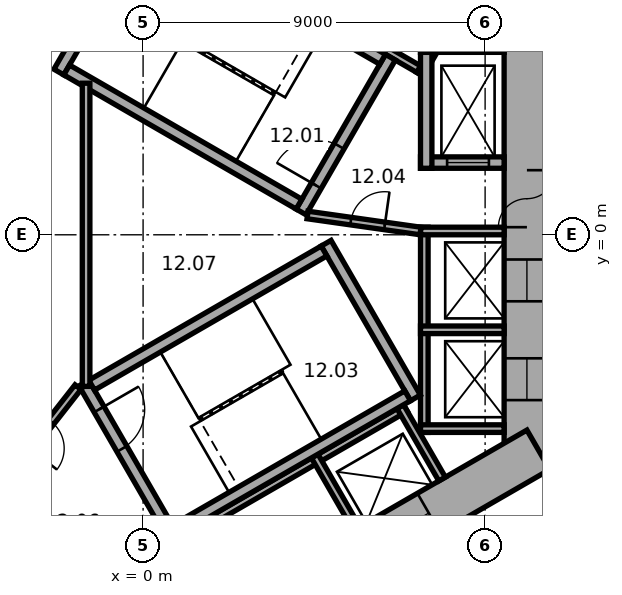
"""IFC4 building model, lengths in metres.
Left out: names, types, materials, properties, quantities, classifications, styles, units other than length and angle.
Written with IfcOpenShell. Run it as: python <this file> out.ifc"""

import sys

from ifc_helpers import new_model, si_unit, direction, frame, frame_2d, origin, place, context, subcontext, project, spatial, rectangle, extrude, element, fill, save


model = new_model("IFC4")
c1 = context("Model", 3, precision=1e-05, world=origin(), true_north=direction((0.0, 1.0)))
c2 = subcontext(c1, "Body", "Model", "MODEL_VIEW")
j1 = project(units=[si_unit("LENGTHUNIT", "METRE"), si_unit("PLANEANGLEUNIT", "RADIAN")], contexts=[c1])
p1 = place(None, origin())
s1 = spatial("IfcSite", under=j1, at=p1, CompositionType="ELEMENT")
p2 = place(p1, origin())
s2 = spatial("IfcBuilding", under=s1, at=p2, CompositionType="ELEMENT")
p3 = place(p2, frame((0.0, 0.0, 60.5)))
s3 = spatial("IfcBuildingStorey", under=s2, at=p3, CompositionType="ELEMENT", Elevation=60.5)
p4 = place(p3, frame((10.1, -6.177, 0.0), z_axis=(0.0, 0.0, 1.0), x_axis=(0.0, 1.0, 0.0)))
e1 = element("IfcWall", 1, at=p4, inside=s3, PredefinedType="SHEAR", context=c2, shape_type="SweptSolid", body=[
    extrude(rectangle(XDim=12.355, YDim=1.2, at=frame_2d((6.177, 0.0))), origin(), (0.0, 0.0, 1.0), 3.3),
])
p5 = place(p4, frame((6.378, 0.0, 0.0)))
e2 = element("IfcOpeningElement", 2, at=p5, cuts=e1, PredefinedType="OPENING", context=c2, shape_type="SweptSolid", body=[
    extrude(rectangle(XDim=1.5, YDim=2.1, at=frame_2d((0.75, 1.05))), frame((0.0, 0.61, 0.0), z_axis=(0.0, -1.0, 0.0), x_axis=(1.0, 0.0, 0.0)), (0.0, 0.0, 1.0), 1.22),
])
p6 = place(p4, frame((1.828, 0.0, 0.0)))
e3 = element("IfcOpeningElement", 3, at=p6, cuts=e1, PredefinedType="OPENING", context=c2, shape_type="SweptSolid", body=[
    extrude(rectangle(XDim=1.1, YDim=2.1, at=frame_2d((0.55, 1.05))), frame((0.0, 0.61, 0.0), z_axis=(0.0, -1.0, 0.0), x_axis=(1.0, 0.0, 0.0)), (0.0, 0.0, 1.0), 1.22),
])
p7 = place(p4, frame((4.427, 0.0, 0.0)))
e4 = element("IfcOpeningElement", 4, at=p7, cuts=e1, PredefinedType="OPENING", context=c2, shape_type="SweptSolid", body=[
    extrude(rectangle(XDim=1.1, YDim=2.1, at=frame_2d((0.55, 1.05))), frame((0.0, 0.61, 0.0), z_axis=(0.0, -1.0, 0.0), x_axis=(1.0, 0.0, 0.0)), (0.0, 0.0, 1.0), 1.22),
])
p8 = place(p3, frame((-10.4, -5.658, 0.0), z_axis=(0.0, 0.0, 1.0), x_axis=(0.866021384402, -0.500006961711, 0.0)))
e5 = element("IfcWall", 5, at=p8, inside=s3, PredefinedType="SHEAR", context=c2, shape_type="SweptSolid", body=[
    extrude(rectangle(XDim=12.355, YDim=1.2, at=frame_2d((6.178, 0.0))), origin(), (0.0, 0.0, 1.0), 3.3),
])
p9 = place(p8, frame((6.378, 0.0, 0.0)))
e6 = element("IfcOpeningElement", 6, at=p9, cuts=e5, PredefinedType="OPENING", context=c2, shape_type="SweptSolid", body=[
    extrude(rectangle(XDim=1.5, YDim=2.1, at=frame_2d((0.75, 1.05))), frame((0.0, 0.61, 0.0), z_axis=(0.0, -1.0, 0.0), x_axis=(1.0, 0.0, 0.0)), (0.0, 0.0, 1.0), 1.22),
])
p10 = place(p8, frame((1.928, 0.0, 0.0)))
e7 = element("IfcOpeningElement", 7, at=p10, cuts=e5, PredefinedType="OPENING", context=c2, shape_type="SweptSolid", body=[
    extrude(rectangle(XDim=0.9, YDim=2.1, at=frame_2d((0.45, 1.05))), frame((0.0, 0.61, 0.0), z_axis=(0.0, -1.0, 0.0), x_axis=(1.0, 0.0, 0.0)), (0.0, 0.0, 1.0), 1.22),
])
p11 = place(p8, frame((4.528, 0.0, 0.0)))
e8 = element("IfcOpeningElement", 8, at=p11, cuts=e5, PredefinedType="OPENING", context=c2, shape_type="SweptSolid", body=[
    extrude(rectangle(XDim=0.9, YDim=2.1, at=frame_2d((0.45, 1.05))), frame((0.0, 0.61, 0.0), z_axis=(0.0, -1.0, 0.0), x_axis=(1.0, 0.0, 0.0)), (0.0, 0.0, 1.0), 1.22),
])
p12 = place(p3, frame((-0.3, -11.836, 0.0), z_axis=(0.0, 0.0, 1.0), x_axis=(0.866021384402, 0.500006961711, 0.0)))
e9 = element("IfcWall", 9, at=p12, inside=s3, PredefinedType="SHEAR", context=c2, shape_type="SweptSolid", body=[
    extrude(rectangle(XDim=12.355, YDim=1.2, at=frame_2d((6.178, 0.0))), origin(), (0.0, 0.0, 1.0), 3.3),
])
p13 = place(p12, frame((4.128, 0.0, 0.0)))
e10 = element("IfcOpeningElement", 10, at=p13, cuts=e9, PredefinedType="OPENING", context=c2, shape_type="SweptSolid", body=[
    extrude(rectangle(XDim=0.9, YDim=2.1, at=frame_2d((0.45, 1.05))), frame((0.0, 0.61, 0.0), z_axis=(0.0, -1.0, 0.0), x_axis=(1.0, 0.0, 0.0)), (0.0, 0.0, 1.0), 1.22),
])
p14 = place(p12, frame((7.928, 0.0, 0.0)))
e11 = element("IfcOpeningElement", 11, at=p14, cuts=e9, PredefinedType="OPENING", context=c2, shape_type="SweptSolid", body=[
    extrude(rectangle(XDim=1.1, YDim=2.1, at=frame_2d((0.55, 1.05))), frame((0.0, 0.61, 0.0), z_axis=(0.0, -1.0, 0.0), x_axis=(1.0, 0.0, 0.0)), (0.0, 0.0, 1.0), 1.22),
])
p15 = place(p3, frame((7.4, -5.2, 0.0), z_axis=(0.0, 0.0, 1.0), x_axis=(0.0, 1.0, 0.0)))
e12 = element("IfcWall", 12, at=p15, inside=s3, PredefinedType="PARTITIONING", context=c2, shape_type="SweptSolid", body=[
    extrude(rectangle(XDim=5.4, YDim=0.2, at=frame_2d((2.7, 0.0))), origin(), (0.0, 0.0, 1.0), 3.05),
])
for number, where, z_axis, x_axis in (
    (13, (7.3, -5.1, 0.0), (0.0, 0.0, 1.0), (1.0, 0.0, 0.0)),
    (14, (7.3, -2.5, 0.0), (0.0, 0.0, 1.0), (1.0, 0.0, 0.0)),
    (15, (7.3, 0.1, 0.0), (0.0, 0.0, 1.0), (1.0, 0.0, 0.0)),
):
    element("IfcWall", number, at=place(p3, frame(where, z_axis=z_axis, x_axis=x_axis)), inside=s3, PredefinedType="PARTITIONING", context=c2, shape_type="SweptSolid", body=[
        extrude(rectangle(XDim=2.2, YDim=0.2, at=frame_2d((1.1, 0.0))), origin(), (0.0, 0.0, 1.0), 3.05),
    ])
p16 = place(p3, frame((7.424, 4.259, 0.0), z_axis=(0.0, 0.0, 1.0), x_axis=(-0.866026010844, 0.49999894854, 0.0)))
e16 = element("IfcWall", 16, at=p16, inside=s3, PredefinedType="PARTITIONING", context=c2, shape_type="SweptSolid", body=[
    extrude(rectangle(XDim=8.0, YDim=0.2, at=frame_2d((4.0, 0.0))), origin(), (0.0, 0.0, 1.0), 3.05),
])
p17 = place(p3, frame((7.287, 4.222, 0.0), z_axis=(0.0, 0.0, 1.0), x_axis=(0.499946605688, 0.86605622881, 0.0)))
e17 = element("IfcWall", 17, at=p17, inside=s3, PredefinedType="PARTITIONING", context=c2, shape_type="SweptSolid", body=[
    extrude(rectangle(XDim=2.2, YDim=0.2, at=frame_2d((1.1, 0.0))), origin(), (0.0, 0.0, 1.0), 3.05),
])
p18 = place(p3, frame((-0.024, -8.559, 0.0), z_axis=(0.0, 0.0, 1.0), x_axis=(0.866026010844, 0.49999894854, 0.0)))
e18 = element("IfcWall", 18, at=p18, inside=s3, PredefinedType="PARTITIONING", context=c2, shape_type="SweptSolid", body=[
    extrude(rectangle(XDim=8.0, YDim=0.2, at=frame_2d((4.0, 0.0))), origin(), (0.0, 0.0, 1.0), 3.05),
])
for number, where, z_axis, x_axis in (
    (19, (4.516, -5.822, 0.0), (0.0, 0.0, 1.0), (0.5, -0.866, 0.0)),
    (20, (6.768, -4.522, 0.0), (0.0, 0.0, 1.0), (0.5, -0.866, 0.0)),
):
    element("IfcWall", number, at=place(p3, frame(where, z_axis=z_axis, x_axis=x_axis)), inside=s3, PredefinedType="PARTITIONING", context=c2, shape_type="SweptSolid", body=[
        extrude(rectangle(XDim=2.2, YDim=0.2, at=frame_2d((1.1, 0.0))), origin(), (0.0, 0.0, 1.0), 3.05),
    ])
p19 = place(p3, frame((4.158, 0.602, 0.0), z_axis=(0.0, 0.0, 1.0), x_axis=(0.499977259774, 0.866038532462, 0.0)))
e21 = element("IfcWall", 21, at=p19, inside=s3, PredefinedType="SHEAR", context=c2, shape_type="SweptSolid", body=[
    extrude(rectangle(XDim=4.7, YDim=0.3, at=frame_2d((2.35, 0.0))), origin(), (0.0, 0.0, 1.0), 3.05),
])
p20 = place(p19, frame((0.8, 0.0, 0.0)))
e22 = element("IfcOpeningElement", 22, at=p20, cuts=e21, PredefinedType="OPENING", context=c2, shape_type="SweptSolid", body=[
    extrude(rectangle(XDim=1.2, YDim=2.1, at=frame_2d((0.6, 1.05))), frame((0.0, 0.16, 0.0), z_axis=(0.0, -1.0, 0.0), x_axis=(1.0, 0.0, 0.0)), (0.0, 0.0, 1.0), 0.32),
])
p21 = place(p3, frame((-2.216, 4.282, 0.0), z_axis=(0.0, 0.0, 1.0), x_axis=(0.499977259774, 0.866038532462, 0.0)))
e23 = element("IfcWall", 23, at=p21, inside=s3, PredefinedType="SHEAR", context=c2, shape_type="SweptSolid", body=[
    extrude(rectangle(XDim=4.7, YDim=0.3, at=frame_2d((2.35, 0.0))), origin(), (0.0, 0.0, 1.0), 3.05),
])
for number, where, z_axis, x_axis in (
    (24, (4.103, 0.807, 0.0), (0.0, 0.0, 1.0), (-0.866, 0.5, 0.0)),
    (25, (6.303, 4.617, 0.0), (0.0, 0.0, 1.0), (-0.866, 0.5, 0.0)),
):
    element("IfcWall", number, at=place(p3, frame(where, z_axis=z_axis, x_axis=x_axis)), inside=s3, PredefinedType="SHEAR", context=c2, shape_type="SweptSolid", body=[
        extrude(rectangle(XDim=7.06, YDim=0.3, at=frame_2d((3.53, 0.0))), origin(), (0.0, 0.0, 1.0), 3.05),
    ])
p22 = place(p3, frame((-1.558, -3.902, 0.0), z_axis=(0.0, 0.0, 1.0), x_axis=(0.499977259774, -0.866038532462, 0.0)))
e26 = element("IfcWall", 26, at=p22, inside=s3, PredefinedType="SHEAR", context=c2, shape_type="SweptSolid", body=[
    extrude(rectangle(XDim=4.7, YDim=0.3, at=frame_2d((2.35, 0.0))), origin(), (0.0, 0.0, 1.0), 3.05),
])
p23 = place(p22, frame((0.8, 0.0, 0.0)))
e27 = element("IfcOpeningElement", 27, at=p23, cuts=e26, PredefinedType="OPENING", context=c2, shape_type="SweptSolid", body=[
    extrude(rectangle(XDim=1.2, YDim=2.1, at=frame_2d((0.6, 1.05))), frame((0.0, 0.16, 0.0), z_axis=(0.0, -1.0, 0.0), x_axis=(1.0, 0.0, 0.0)), (0.0, 0.0, 1.0), 0.32),
])
p24 = place(p3, frame((4.816, -0.222, 0.0), z_axis=(0.0, 0.0, 1.0), x_axis=(0.499977259774, -0.866038532462, 0.0)))
e28 = element("IfcWall", 28, at=p24, inside=s3, PredefinedType="SHEAR", context=c2, shape_type="SweptSolid", body=[
    extrude(rectangle(XDim=4.7, YDim=0.3, at=frame_2d((2.35, 0.0))), origin(), (0.0, 0.0, 1.0), 3.05),
])
for number, where, z_axis, x_axis in (
    (29, (-1.353, -3.957, 0.0), (0.0, 0.0, 1.0), (0.866, 0.5, 0.0)),
    (30, (0.847, -7.767, 0.0), (0.0, 0.0, 1.0), (0.866, 0.5, 0.0)),
):
    element("IfcWall", number, at=place(p3, frame(where, z_axis=z_axis, x_axis=x_axis)), inside=s3, PredefinedType="SHEAR", context=c2, shape_type="SweptSolid", body=[
        extrude(rectangle(XDim=7.06, YDim=0.3, at=frame_2d((3.53, 0.0))), origin(), (0.0, 0.0, 1.0), 3.05),
    ])
p25 = place(p3, frame((7.3, 1.9, 0.0), z_axis=(0.0, 0.0, 1.0), x_axis=(1.0, 0.0, 0.0)))
e31 = element("IfcWall", 31, at=p25, inside=s3, PredefinedType="SHEAR", context=c2, shape_type="SweptSolid", body=[
    extrude(rectangle(XDim=2.2, YDim=0.3, at=frame_2d((1.1, 0.0))), origin(), (0.0, 0.0, 1.0), 3.05),
])
p26 = place(p25, frame((0.7, 0.0, 0.0)))
e32 = element("IfcOpeningElement", 32, at=p26, cuts=e31, PredefinedType="OPENING", context=c2, shape_type="SweptSolid", body=[
    extrude(rectangle(XDim=1.1, YDim=2.1, at=frame_2d((0.55, 1.05))), frame((0.0, 0.16, 0.0), z_axis=(0.0, -1.0, 0.0), x_axis=(1.0, 0.0, 0.0)), (0.0, 0.0, 1.0), 0.32),
])
p27 = place(p3, frame((7.45, 1.75, 0.0), z_axis=(0.0, 0.0, 1.0), x_axis=(0.0, 1.0, 0.0)))
e33 = element("IfcWall", 33, at=p27, inside=s3, PredefinedType="SHEAR", context=c2, shape_type="SweptSolid", body=[
    extrude(rectangle(XDim=3.35, YDim=0.3, at=frame_2d((1.675, 0.0))), origin(), (0.0, 0.0, 1.0), 3.05),
])
p28 = place(p3, frame((7.3, 4.95, 0.0), z_axis=(0.0, 0.0, 1.0), x_axis=(1.0, 0.0, 0.0)))
e34 = element("IfcWall", 34, at=p28, inside=s3, PredefinedType="SHEAR", context=c2, shape_type="SweptSolid", body=[
    extrude(rectangle(XDim=2.2, YDim=0.3, at=frame_2d((1.1, 0.0))), origin(), (0.0, 0.0, 1.0), 3.05),
])
p29 = place(p3, frame((4.327, 0.521, 0.0), z_axis=(0.0, 0.0, 1.0), x_axis=(0.990124376366, -0.14019172346, 0.0)))
e35 = element("IfcWall", 35, at=p29, inside=s3, PredefinedType="PARTITIONING", context=c2, shape_type="SweptSolid", body=[
    extrude(rectangle(XDim=3.002, YDim=0.2, at=frame_2d((1.501, 0.0))), origin(), (0.0, 0.0, 1.0), 3.05),
])
p30 = place(p29, frame((1.15, 0.0, 0.0)))
e36 = element("IfcOpeningElement", 36, at=p30, cuts=e35, PredefinedType="OPENING", context=c2, shape_type="SweptSolid", body=[
    extrude(rectangle(XDim=0.9, YDim=2.1, at=frame_2d((0.45, 1.05))), frame((0.0, 0.11, 0.0), z_axis=(0.0, -1.0, 0.0), x_axis=(1.0, 0.0, 0.0)), (0.0, 0.0, 1.0), 0.22),
])
p31 = place(p3, frame((-1.712, -4.008, 0.0), z_axis=(0.0, 0.0, 1.0), x_axis=(-0.616549420702, -0.787316208287, 0.0)))
e37 = element("IfcWall", 37, at=p31, inside=s3, PredefinedType="PARTITIONING", context=c2, shape_type="SweptSolid", body=[
    extrude(rectangle(XDim=3.002, YDim=0.2, at=frame_2d((1.501, 0.0))), origin(), (0.0, 0.0, 1.0), 3.05),
])
p32 = place(p31, frame((1.15, 0.0, 0.0)))
e38 = element("IfcOpeningElement", 38, at=p32, cuts=e37, PredefinedType="OPENING", context=c2, shape_type="SweptSolid", body=[
    extrude(rectangle(XDim=0.9, YDim=2.1, at=frame_2d((0.45, 1.05))), frame((0.0, 0.11, 0.0), z_axis=(0.0, -1.0, 0.0), x_axis=(1.0, 0.0, 0.0)), (0.0, 0.0, 1.0), 0.22),
])
p33 = place(p3, frame((-1.5, -3.988, 0.0), z_axis=(0.0, 0.0, 1.0), x_axis=(0.0, 1.0, 0.0)))
e39 = element("IfcWall", 39, at=p33, inside=s3, PredefinedType="PARTITIONING", context=c2, shape_type="SweptSolid", body=[
    extrude(rectangle(XDim=7.977, YDim=0.2, at=frame_2d((3.988, 0.0))), origin(), (0.0, 0.0, 1.0), 3.05),
])
p34 = place(p5, origin())
e40 = element("IfcDoor", 40, at=p34, inside=s3, OperationType="DOUBLE_DOOR_SINGLE_SWING", PredefinedType="DOOR", context=c2, shape_type="SweptSolid", body=[
    extrude(rectangle(XDim=1.5, YDim=2.1, at=frame_2d((0.75, 1.05))), frame((0.0, 0.025, 0.0), z_axis=(0.0, -1.0, 0.0), x_axis=(1.0, 0.0, 0.0)), (0.0, 0.0, 1.0), 0.05),
])
fill(e2, e40)
p35 = place(p20, origin())
e41 = element("IfcDoor", 41, at=p35, inside=s3, OperationType="SINGLE_SWING_RIGHT", PredefinedType="DOOR", context=c2, shape_type="SweptSolid", body=[
    extrude(rectangle(XDim=1.2, YDim=2.1, at=frame_2d((0.6, 1.05))), frame((0.0, 0.025, 0.0), z_axis=(0.0, -1.0, 0.0), x_axis=(1.0, 0.0, 0.0)), (0.0, 0.0, 1.0), 0.05),
])
fill(e22, e41)
p36 = place(p23, origin())
e42 = element("IfcDoor", 42, at=p36, inside=s3, OperationType="SINGLE_SWING_RIGHT", PredefinedType="DOOR", context=c2, shape_type="SweptSolid", body=[
    extrude(rectangle(XDim=1.2, YDim=2.1, at=frame_2d((0.6, 1.05))), frame((0.0, 0.025, 0.0), z_axis=(0.0, -1.0, 0.0), x_axis=(1.0, 0.0, 0.0)), (0.0, 0.0, 1.0), 0.05),
])
fill(e27, e42)
p37 = place(p30, origin())
e43 = element("IfcDoor", 43, at=p37, inside=s3, OperationType="SINGLE_SWING_LEFT", PredefinedType="DOOR", context=c2, shape_type="SweptSolid", body=[
    extrude(rectangle(XDim=0.9, YDim=2.1, at=frame_2d((0.45, 1.05))), frame((0.0, 0.025, 0.0), z_axis=(0.0, -1.0, 0.0), x_axis=(1.0, 0.0, 0.0)), (0.0, 0.0, 1.0), 0.05),
])
fill(e36, e43)
p38 = place(p26, origin())
e44 = element("IfcDoor", 44, at=p38, inside=s3, OperationType="DOUBLE_DOOR_SLIDING", PredefinedType="DOOR", context=c2, shape_type="SweptSolid", body=[
    extrude(rectangle(XDim=1.1, YDim=2.1, at=frame_2d((0.55, 1.05))), frame((0.0, 0.025, 0.0), z_axis=(0.0, -1.0, 0.0), x_axis=(1.0, 0.0, 0.0)), (0.0, 0.0, 1.0), 0.05),
])
fill(e32, e44)
p39 = place(p6, origin())
e45 = element("IfcDoor", 45, at=p39, inside=s3, OperationType="DOUBLE_DOOR_SLIDING", PredefinedType="DOOR", context=c2, shape_type="SweptSolid", body=[
    extrude(rectangle(XDim=1.1, YDim=2.1, at=frame_2d((0.55, 1.05))), frame((0.0, 0.025, 0.0), z_axis=(0.0, -1.0, 0.0), x_axis=(1.0, 0.0, 0.0)), (0.0, 0.0, 1.0), 0.05),
])
fill(e3, e45)
p40 = place(p7, origin())
e46 = element("IfcDoor", 46, at=p40, inside=s3, OperationType="DOUBLE_DOOR_SLIDING", PredefinedType="DOOR", context=c2, shape_type="SweptSolid", body=[
    extrude(rectangle(XDim=1.1, YDim=2.1, at=frame_2d((0.55, 1.05))), frame((0.0, 0.025, 0.0), z_axis=(0.0, -1.0, 0.0), x_axis=(1.0, 0.0, 0.0)), (0.0, 0.0, 1.0), 0.05),
])
fill(e4, e46)
p41 = place(p14, origin())
e47 = element("IfcDoor", 47, at=p41, inside=s3, OperationType="DOUBLE_DOOR_SLIDING", PredefinedType="DOOR", context=c2, shape_type="SweptSolid", body=[
    extrude(rectangle(XDim=1.1, YDim=2.1, at=frame_2d((0.55, 1.05))), frame((0.0, 0.025, 0.0), z_axis=(0.0, -1.0, 0.0), x_axis=(1.0, 0.0, 0.0)), (0.0, 0.0, 1.0), 0.05),
])
fill(e11, e47)
save(model, sys.argv[1])
